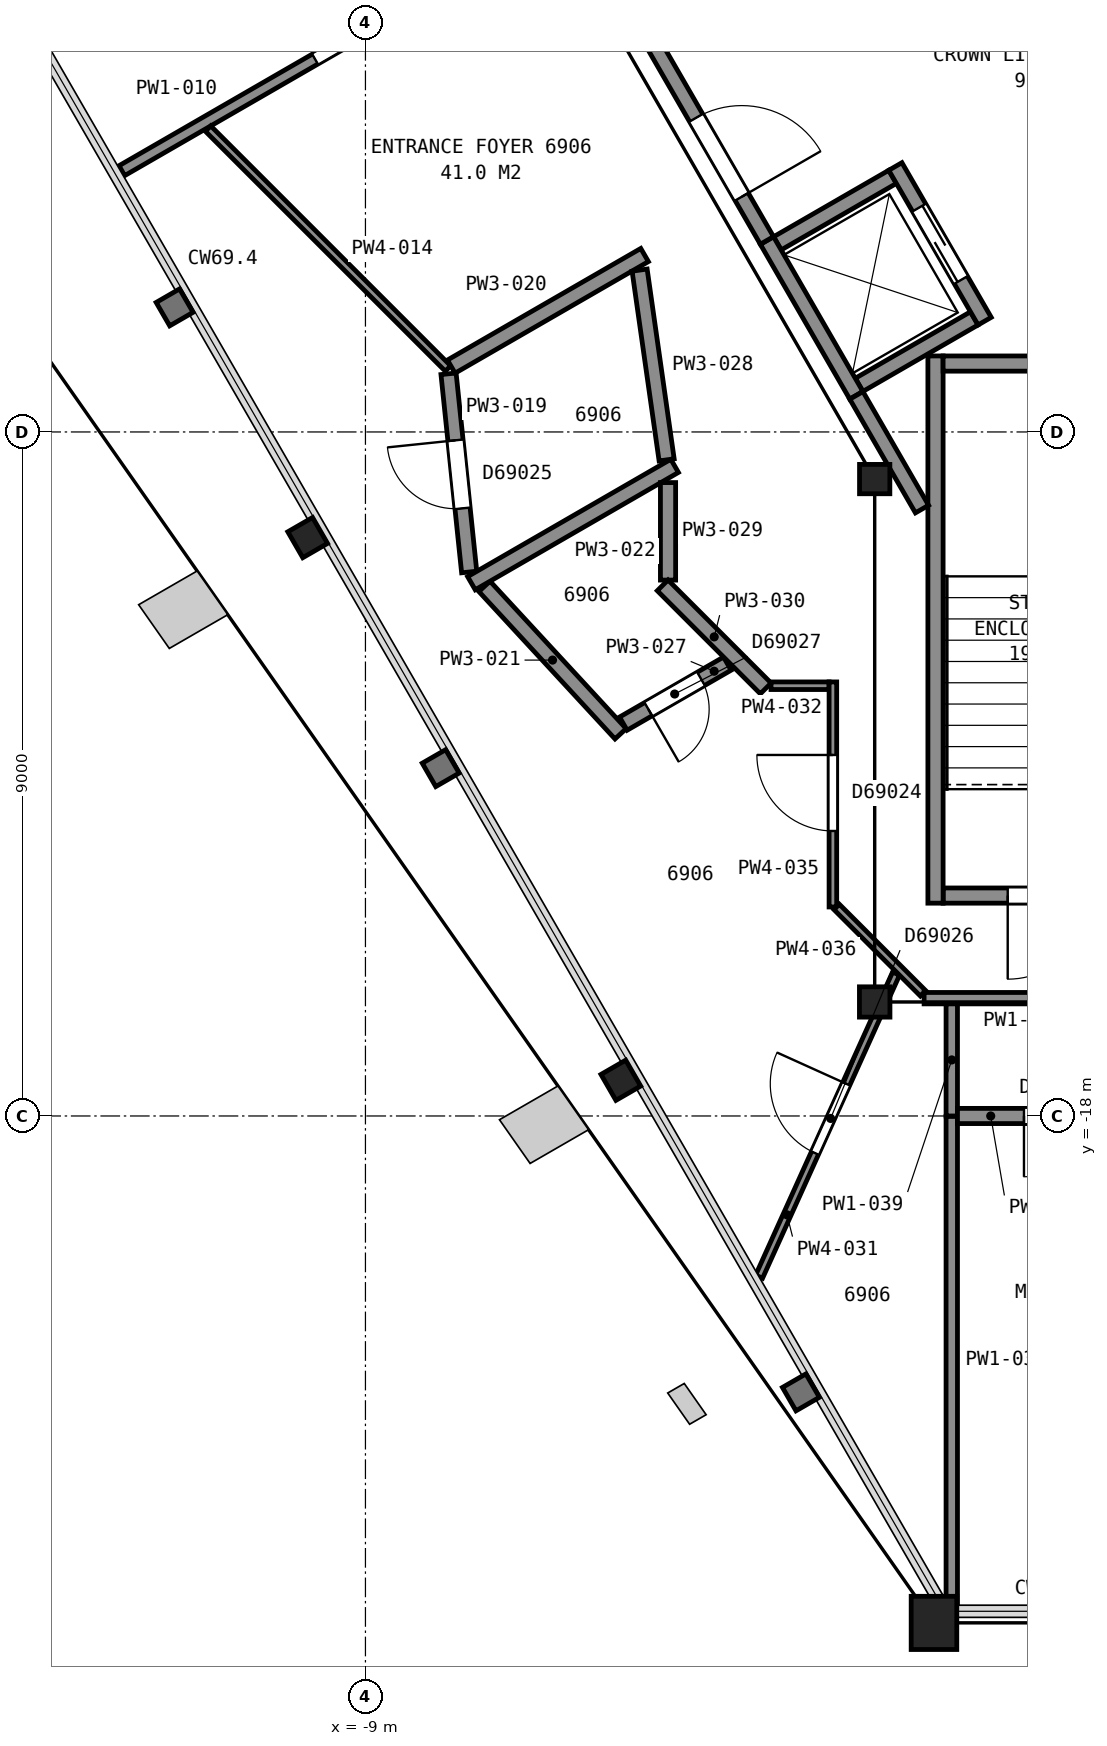
"""IFC4 building model, lengths in metres.
Left out: names, types, materials, properties, quantities, classifications, styles, units other than length and angle.
Written with IfcOpenShell. Run it as: python <this file> out.ifc"""

import sys

from ifc_helpers import new_model, si_unit, direction, frame, frame_2d, origin, origin_2d, place, context, subcontext, project, spatial, rectangle, hollow_rectangle, i_section, extrude, element, fill, save


model = new_model("IFC4")
c1 = context("Model", 3, precision=1e-05, world=origin(), true_north=direction((0.0, 1.0)))
c2 = subcontext(c1, "Body", "Model", "MODEL_VIEW")
j1 = project(units=[si_unit("LENGTHUNIT", "METRE"), si_unit("PLANEANGLEUNIT", "RADIAN")], contexts=[c1])
p1 = place(None, origin())
s1 = spatial("IfcSite", under=j1, at=p1, CompositionType="ELEMENT")
p2 = place(p1, origin())
s2 = spatial("IfcBuilding", under=s1, at=p2, CompositionType="ELEMENT")
p3 = place(p2, frame((0.0, 0.0, 275.1)))
s3 = spatial("IfcBuildingStorey", under=s2, at=p3, CompositionType="ELEMENT", Elevation=275.1)
for number, where, z_axis, x_axis in (
    (1, (-9.76, -10.39, 0.0), (0.0, 0.0, 1.0), (-0.5, 0.866, 0.0)),
    (2, (-5.64, -17.53, 0.0), (0.0, 0.0, 1.0), (-0.5, 0.866, 0.0)),
):
    element("IfcColumn", number, at=place(p3, frame(where, z_axis=z_axis, x_axis=x_axis)), inside=s3, PredefinedType="COLUMN", context=c2, shape_type="SweptSolid", body=[
        extrude(i_section(OverallWidth=0.394, OverallDepth=0.376, WebThickness=0.017, FlangeThickness=0.028, FilletRadius=0.015, at=origin_2d()), origin(), (0.0, 0.0, 1.0), 3.7),
    ])
p4 = place(p3, frame((-1.52, -24.67, 0.0), z_axis=(0.0, 0.0, 1.0), x_axis=(-1.0, 0.0, 0.0)))
e3 = element("IfcColumn", 3, at=p4, inside=s3, PredefinedType="COLUMN", context=c2, shape_type="SweptSolid", body=[
    extrude(hollow_rectangle(XDim=0.6, YDim=0.7, WallThickness=0.04, at=origin_2d()), origin(), (0.0, 0.0, 1.0), 3.7),
])
p5 = place(p3, frame((-2.3, -9.62, 0.0), z_axis=(0.0, 0.0, 1.0), x_axis=(1.0, 0.0, 0.0)))
e4 = element("IfcColumn", 4, at=p5, inside=s3, PredefinedType="COLUMN", context=c2, shape_type="SweptSolid", body=[
    extrude(i_section(OverallWidth=0.399, OverallDepth=0.386, WebThickness=0.021, FlangeThickness=0.033, FilletRadius=0.015, at=origin_2d()), origin(), (0.0, 0.0, 1.0), 3.7),
])
p6 = place(p3, frame((-2.3, -16.5, 0.0), z_axis=(0.0, 0.0, 1.0), x_axis=(-1.0, 0.0, 0.0)))
e5 = element("IfcColumn", 5, at=p6, inside=s3, PredefinedType="COLUMN", context=c2, shape_type="SweptSolid", body=[
    extrude(i_section(OverallWidth=0.401, OverallDepth=0.399, WebThickness=0.025, FlangeThickness=0.04, FilletRadius=0.015, at=origin_2d()), origin(), (0.0, 0.0, 1.0), 3.7),
])
p7 = place(p3, frame((-1.4, -15.1, 0.0), z_axis=(0.0, 0.0, 1.0), x_axis=(1.0, 0.0, 0.0)))
e6 = element("IfcWall", 6, at=p7, inside=s3, PredefinedType="PARTITIONING", context=c2, shape_type="SweptSolid", body=[
    extrude(rectangle(XDim=2.8, YDim=0.2, at=frame_2d((1.4, 0.0))), origin(), (0.0, 0.0, 1.0), 3.45),
])
p8 = place(p7, frame((0.85, 0.0, 0.0)))
e7 = element("IfcOpeningElement", 7, at=p8, cuts=e6, PredefinedType="OPENING", context=c2, shape_type="SweptSolid", body=[
    extrude(rectangle(XDim=1.1, YDim=2.1, at=frame_2d((0.55, 1.05))), frame((0.0, 0.11, 0.0), z_axis=(0.0, -1.0, 0.0), x_axis=(1.0, 0.0, 0.0)), (0.0, 0.0, 1.0), 0.22),
])
p9 = place(p3, frame((-1.5, -8.0, 0.0), z_axis=(0.0, 0.0, 1.0), x_axis=(0.0, -1.0, 0.0)))
e8 = element("IfcWall", 8, at=p9, inside=s3, PredefinedType="PARTITIONING", context=c2, shape_type="SweptSolid", body=[
    extrude(rectangle(XDim=7.2, YDim=0.2, at=frame_2d((3.6, 0.0))), origin(), (0.0, 0.0, 1.0), 3.45),
])
p10 = place(p3, frame((-1.4, -8.1, 0.0), z_axis=(0.0, 0.0, 1.0), x_axis=(1.0, 0.0, 0.0)))
e9 = element("IfcWall", 9, at=p10, inside=s3, PredefinedType="PARTITIONING", context=c2, shape_type="SweptSolid", body=[
    extrude(rectangle(XDim=2.8, YDim=0.2, at=frame_2d((1.4, 0.0))), origin(), (0.0, 0.0, 1.0), 3.45),
])
for number, where, z_axis, x_axis in (
    (10, (-2.505, -8.38, 0.0), (0.0, 0.0, 1.0), (0.866, 0.5, 0.0)),
    (11, (-3.58, -6.519, 0.0), (0.0, 0.0, 1.0), (0.866, 0.5, 0.0)),
):
    element("IfcWall", number, at=place(p3, frame(where, z_axis=z_axis, x_axis=x_axis)), inside=s3, PredefinedType="PARTITIONING", context=c2, shape_type="SweptSolid", body=[
        extrude(rectangle(XDim=1.75, YDim=0.2, at=frame_2d((0.875, 0.0))), origin(), (0.0, 0.0, 1.0), 3.7),
    ])
p11 = place(p3, frame((-0.853, -7.542, 0.0), z_axis=(0.0, 0.0, 1.0), x_axis=(-0.500016218704, 0.866016039709, 0.0)))
e12 = element("IfcWall", 12, at=p11, inside=s3, PredefinedType="PARTITIONING", context=c2, shape_type="SweptSolid", body=[
    extrude(rectangle(XDim=2.35, YDim=0.2, at=frame_2d((1.175, 0.0))), origin(), (0.0, 0.0, 1.0), 3.7),
])
p12 = place(p11, frame((0.625, 0.0, 0.0)))
e13 = element("IfcOpeningElement", 13, at=p12, cuts=e12, PredefinedType="OPENING", context=c2, shape_type="SweptSolid", body=[
    extrude(rectangle(XDim=1.1, YDim=2.1, at=frame_2d((0.55, 1.05))), frame((0.0, 0.11, 0.0), z_axis=(0.0, -1.0, 0.0), x_axis=(1.0, 0.0, 0.0)), (0.0, 0.0, 1.0), 0.22),
])
p13 = place(p3, frame((-2.542, -8.517, 0.0), z_axis=(0.0, 0.0, 1.0), x_axis=(-0.500016218704, 0.866016039709, 0.0)))
e14 = element("IfcWall", 14, at=p13, inside=s3, PredefinedType="PARTITIONING", context=c2, shape_type="SweptSolid", body=[
    extrude(rectangle(XDim=2.35, YDim=0.2, at=frame_2d((1.175, 0.0))), origin(), (0.0, 0.0, 1.0), 3.7),
])
p14 = place(p3, frame((-7.141, -0.551, 0.0), z_axis=(0.0, 0.0, 1.0), x_axis=(0.500001302854, -0.86602465158, 0.0)))
e15 = element("IfcWall", 15, at=p14, inside=s3, PredefinedType="PARTITIONING", context=c2, shape_type="SweptSolid", body=[
    extrude(rectangle(XDim=6.846, YDim=0.2, at=frame_2d((3.423, 0.0))), origin(), (0.0, 0.0, 1.0), 3.45),
])
p15 = place(p14, frame((4.983, 0.0, 0.0)))
e16 = element("IfcOpeningElement", 16, at=p15, cuts=e15, PredefinedType="OPENING", context=c2, shape_type="SweptSolid", body=[
    extrude(rectangle(XDim=1.2, YDim=2.1, at=frame_2d((0.6, 1.05))), frame((0.0, 0.11, 0.0), z_axis=(0.0, -1.0, 0.0), x_axis=(1.0, 0.0, 0.0)), (0.0, 0.0, 1.0), 0.22),
])
p16 = place(p3, frame((-2.541, -8.519, 0.0), z_axis=(0.0, 0.0, 1.0), x_axis=(0.500016142392, -0.86601608377, 0.0)))
e17 = element("IfcWall", 17, at=p16, inside=s3, PredefinedType="PARTITIONING", context=c2, shape_type="SweptSolid", body=[
    extrude(rectangle(XDim=1.727, YDim=0.2, at=frame_2d((0.864, 0.0))), origin(), (0.0, 0.0, 1.0), 3.45),
])
p17 = place(p3, frame((-12.205, -5.562, 0.0), z_axis=(0.0, 0.0, 1.0), x_axis=(0.866006351856, 0.500032997455, 0.0)))
e18 = element("IfcWall", 18, at=p17, inside=s3, PredefinedType="PARTITIONING", context=c2, shape_type="SweptSolid", body=[
    extrude(rectangle(XDim=5.671, YDim=0.15, at=frame_2d((2.835, 0.0))), origin(), (0.0, 0.0, 1.0), 2.723),
])
p18 = place(p17, frame((2.935, 0.0, 0.0)))
e19 = element("IfcOpeningElement", 19, at=p18, cuts=e18, PredefinedType="OPENING", context=c2, shape_type="SweptSolid", body=[
    extrude(rectangle(XDim=1.0, YDim=2.1, at=frame_2d((0.5, 1.05))), frame((0.0, 0.085, 0.0), z_axis=(0.0, -1.0, 0.0), x_axis=(1.0, 0.0, 0.0)), (0.0, 0.0, 1.0), 0.17),
])
p19 = place(p3, frame((-11.071, -5.008, 0.0), z_axis=(0.0, 0.0, 1.0), x_axis=(0.707079435951, -0.707134125365, 0.0)))
e20 = element("IfcWall", 20, at=p19, inside=s3, PredefinedType="PARTITIONING", context=c2, shape_type="SweptSolid", body=[
    extrude(rectangle(XDim=4.464, YDim=0.1, at=frame_2d((2.232, 0.0))), origin(), (0.0, 0.0, 1.0), 2.723),
])
p20 = place(p3, frame((-7.907, -8.235, 0.0), z_axis=(0.0, 0.0, 1.0), x_axis=(0.103623353624, -0.994616609847, 0.0)))
e21 = element("IfcWall", 21, at=p20, inside=s3, PredefinedType="PARTITIONING", context=c2, shape_type="SweptSolid", body=[
    extrude(rectangle(XDim=2.622, YDim=0.2, at=frame_2d((1.311, 0.0))), origin(), (0.0, 0.0, 1.0), 2.723),
])
p21 = place(p20, frame((0.88, 0.0, 0.0)))
e22 = element("IfcOpeningElement", 22, at=p21, cuts=e21, PredefinedType="OPENING", context=c2, shape_type="SweptSolid", body=[
    extrude(rectangle(XDim=0.9, YDim=2.1, at=frame_2d((0.45, 1.05))), frame((0.0, 0.11, 0.0), z_axis=(0.0, -1.0, 0.0), x_axis=(1.0, 0.0, 0.0)), (0.0, 0.0, 1.0), 0.22),
])
p22 = place(p3, frame((-7.871, -8.14, 0.0), z_axis=(0.0, 0.0, 1.0), x_axis=(0.866106676517, 0.49985920507, 0.0)))
e23 = element("IfcWall", 23, at=p22, inside=s3, PredefinedType="PARTITIONING", context=c2, shape_type="SweptSolid", body=[
    extrude(rectangle(XDim=2.936, YDim=0.2, at=frame_2d((1.468, 0.0))), origin(), (0.0, 0.0, 1.0), 2.723),
])
p23 = place(p3, frame((-7.434, -11.032, 0.0), z_axis=(0.0, 0.0, 1.0), x_axis=(0.678387636859, -0.734704167782, 0.0)))
e24 = element("IfcWall", 24, at=p23, inside=s3, PredefinedType="PARTITIONING", context=c2, shape_type="SweptSolid", body=[
    extrude(rectangle(XDim=2.64, YDim=0.2, at=frame_2d((1.32, 0.0))), origin(), (0.0, 0.0, 1.0), 2.723),
])
p24 = place(p3, frame((-7.606, -10.99, 0.0), z_axis=(0.0, 0.0, 1.0), x_axis=(0.865956409518, 0.500119482538, 0.0)))
e25 = element("IfcWall", 25, at=p24, inside=s3, PredefinedType="PARTITIONING", context=c2, shape_type="SweptSolid", body=[
    extrude(rectangle(XDim=3.087, YDim=0.2, at=frame_2d((1.543, 0.0))), origin(), (0.0, 0.0, 1.0), 2.723),
])
p25 = place(p3, frame((-5.607, -12.838, 0.0), z_axis=(0.0, 0.0, 1.0), x_axis=(0.866095534226, 0.499878510834, 0.0)))
e26 = element("IfcWall", 26, at=p25, inside=s3, PredefinedType="PARTITIONING", context=c2, shape_type="SweptSolid", body=[
    extrude(rectangle(XDim=1.58, YDim=0.2, at=frame_2d((0.79, 0.0))), origin(), (0.0, 0.0, 1.0), 2.723),
])
p26 = place(p25, frame((0.38, 0.0, 0.0)))
e27 = element("IfcOpeningElement", 27, at=p26, cuts=e26, PredefinedType="OPENING", context=c2, shape_type="SweptSolid", body=[
    extrude(rectangle(XDim=0.8, YDim=2.1, at=frame_2d((0.4, 1.05))), frame((0.0, 0.11, 0.0), z_axis=(0.0, -1.0, 0.0), x_axis=(1.0, 0.0, 0.0)), (0.0, 0.0, 1.0), 0.22),
])
p27 = place(p3, frame((-5.393, -6.871, 0.0), z_axis=(0.0, 0.0, 1.0), x_axis=(0.140960508483, -0.990015219604, 0.0)))
e28 = element("IfcWall", 28, at=p27, inside=s3, PredefinedType="PARTITIONING", context=c2, shape_type="SweptSolid", body=[
    extrude(rectangle(XDim=2.522, YDim=0.2, at=frame_2d((1.261, 0.0))), origin(), (0.0, 0.0, 1.0), 2.723),
])
p28 = place(p3, frame((-5.019, -10.949, 0.0), z_axis=(0.0, 0.0, 1.0), x_axis=(0.0, 1.0, 0.0)))
e29 = element("IfcWall", 29, at=p28, inside=s3, PredefinedType="PARTITIONING", context=c2, shape_type="SweptSolid", body=[
    extrude(rectangle(XDim=1.283, YDim=0.2, at=frame_2d((0.642, 0.0))), origin(), (0.0, 0.0, 1.0), 2.723),
])
p29 = place(p3, frame((-5.09, -11.018, 0.0), z_axis=(0.0, 0.0, 1.0), x_axis=(0.707106781187, -0.707106781187, 0.0)))
e30 = element("IfcWall", 30, at=p29, inside=s3, PredefinedType="PARTITIONING", context=c2, shape_type="SweptSolid", body=[
    extrude(rectangle(XDim=1.918, YDim=0.2, at=frame_2d((0.959, 0.0))), origin(), (0.0, 0.0, 1.0), 2.723),
])
p30 = place(p3, frame((-2.019, -16.127, 0.0), z_axis=(0.0, 0.0, 1.0), x_axis=(-0.411876718461, -0.911239578151, 0.0)))
e31 = element("IfcWall", 31, at=p30, inside=s3, PredefinedType="PARTITIONING", context=c2, shape_type="SweptSolid", body=[
    extrude(rectangle(XDim=4.376, YDim=0.1, at=frame_2d((2.188, 0.0))), origin(), (0.0, 0.0, 1.0), 2.723),
])
p31 = place(p30, frame((1.591, 0.0, 0.0)))
e32 = element("IfcOpeningElement", 32, at=p31, cuts=e31, PredefinedType="OPENING", context=c2, shape_type="SweptSolid", body=[
    extrude(rectangle(XDim=1.0, YDim=2.1, at=frame_2d((0.5, 1.05))), frame((0.0, 0.06, 0.0), z_axis=(0.0, -1.0, 0.0), x_axis=(1.0, 0.0, 0.0)), (0.0, 0.0, 1.0), 0.12),
])
p32 = place(p3, frame((-3.664, -12.339, 0.0), z_axis=(0.0, 0.0, 1.0), x_axis=(1.0, 0.0, 0.0)))
e33 = element("IfcWall", 33, at=p32, inside=s3, PredefinedType="PARTITIONING", context=c2, shape_type="SweptSolid", body=[
    extrude(rectangle(XDim=0.764, YDim=0.1, at=frame_2d((0.382, 0.0))), origin(), (0.0, 0.0, 1.0), 2.723),
])
p33 = place(p3, frame((-2.85, -15.25, 0.0), z_axis=(0.0, 0.0, 1.0), x_axis=(0.0, 1.0, 0.0)))
e34 = element("IfcWall", 34, at=p33, inside=s3, PredefinedType="PARTITIONING", context=c2, shape_type="SweptSolid", body=[
    extrude(rectangle(XDim=2.961, YDim=0.1, at=frame_2d((1.48, 0.0))), origin(), (0.0, 0.0, 1.0), 2.723),
])
p34 = place(p33, frame((1.0, 0.0, 0.0)))
e35 = element("IfcOpeningElement", 35, at=p34, cuts=e34, PredefinedType="OPENING", context=c2, shape_type="SweptSolid", body=[
    extrude(rectangle(XDim=1.0, YDim=2.1, at=frame_2d((0.5, 1.05))), frame((0.0, 0.06, 0.0), z_axis=(0.0, -1.0, 0.0), x_axis=(1.0, 0.0, 0.0)), (0.0, 0.0, 1.0), 0.12),
])
p35 = place(p3, frame((-2.801, -15.25, 0.0), z_axis=(0.0, 0.0, 1.0), x_axis=(0.707106781187, -0.707106781187, 0.0)))
e36 = element("IfcWall", 36, at=p35, inside=s3, PredefinedType="PARTITIONING", context=c2, shape_type="SweptSolid", body=[
    extrude(rectangle(XDim=1.608, YDim=0.1, at=frame_2d((0.804, 0.0))), origin(), (0.0, 0.0, 1.0), 2.723),
])
p36 = place(p3, frame((-1.65, -16.45, 0.0), z_axis=(0.0, 0.0, 1.0), x_axis=(1.0, 0.0, 0.0)))
e37 = element("IfcWall", 37, at=p36, inside=s3, PredefinedType="PARTITIONING", context=c2, shape_type="SweptSolid", body=[
    extrude(rectangle(XDim=2.625, YDim=0.15, at=frame_2d((1.312, 0.0))), origin(), (0.0, 0.0, 1.0), 2.723),
])
p37 = place(p3, frame((-1.286, -24.421, 0.0), z_axis=(0.0, 0.0, 1.0), x_axis=(0.0, 1.0, 0.0)))
e38 = element("IfcWall", 38, at=p37, inside=s3, PredefinedType="PARTITIONING", context=c2, shape_type="SweptSolid", body=[
    extrude(rectangle(XDim=6.416, YDim=0.15, at=frame_2d((3.208, 0.0))), origin(), (0.0, 0.0, 1.0), 2.723),
])
p38 = place(p3, frame((-1.286, -18.0, 0.0), z_axis=(0.0, 0.0, 1.0), x_axis=(0.0, 1.0, 0.0)))
e39 = element("IfcWall", 39, at=p38, inside=s3, PredefinedType="PARTITIONING", context=c2, shape_type="SweptSolid", body=[
    extrude(rectangle(XDim=1.475, YDim=0.15, at=frame_2d((0.738, 0.0))), origin(), (0.0, 0.0, 1.0), 2.723),
])
p39 = place(p3, frame((-1.211, -18.0, 0.0), z_axis=(0.0, 0.0, 1.0), x_axis=(1.0, 0.0, 0.0)))
e40 = element("IfcWall", 40, at=p39, inside=s3, PredefinedType="PARTITIONING", context=c2, shape_type="SweptSolid", body=[
    extrude(rectangle(XDim=2.511, YDim=0.2, at=frame_2d((1.255, 0.0))), origin(), (0.0, 0.0, 1.0), 2.723),
])
p40 = place(p39, frame((0.875, 0.0, 0.0)))
e41 = element("IfcOpeningElement", 41, at=p40, cuts=e40, PredefinedType="OPENING", context=c2, shape_type="SweptSolid", body=[
    extrude(rectangle(XDim=0.8, YDim=2.1, at=frame_2d((0.4, 1.05))), frame((0.0, 0.11, 0.0), z_axis=(0.0, -1.0, 0.0), x_axis=(1.0, 0.0, 0.0)), (0.0, 0.0, 1.0), 0.22),
])
p41 = place(p8, origin())
e42 = element("IfcDoor", 42, at=p41, inside=s3, OperationType="SINGLE_SWING_LEFT", PredefinedType="DOOR", context=c2, shape_type="SweptSolid", body=[
    extrude(rectangle(XDim=1.1, YDim=2.1, at=frame_2d((0.55, 1.05))), frame((0.0, 0.025, 0.0), z_axis=(0.0, -1.0, 0.0), x_axis=(1.0, 0.0, 0.0)), (0.0, 0.0, 1.0), 0.05),
])
fill(e7, e42)
p42 = place(p12, origin())
e43 = element("IfcDoor", 43, at=p42, inside=s3, OperationType="SLIDING_TO_LEFT", PredefinedType="DOOR", context=c2, shape_type="SweptSolid", body=[
    extrude(rectangle(XDim=1.1, YDim=2.1, at=frame_2d((0.55, 1.05))), frame((0.0, 0.025, 0.0), z_axis=(0.0, -1.0, 0.0), x_axis=(1.0, 0.0, 0.0)), (0.0, 0.0, 1.0), 0.05),
])
fill(e13, e43)
p43 = place(p15, origin())
e44 = element("IfcDoor", 44, at=p43, inside=s3, OperationType="SINGLE_SWING_RIGHT", PredefinedType="DOOR", context=c2, shape_type="SweptSolid", body=[
    extrude(rectangle(XDim=1.2, YDim=2.1, at=frame_2d((0.6, 1.05))), frame((0.0, 0.025, 0.0), z_axis=(0.0, -1.0, 0.0), x_axis=(1.0, 0.0, 0.0)), (0.0, 0.0, 1.0), 0.05),
])
fill(e16, e44)
p44 = place(p18, origin())
e45 = element("IfcDoor", 45, at=p44, inside=s3, OperationType="SINGLE_SWING_RIGHT", PredefinedType="DOOR", context=c2, shape_type="SweptSolid", body=[
    extrude(rectangle(XDim=1.0, YDim=2.1, at=frame_2d((0.5, 1.05))), frame((0.0, 0.025, 0.0), z_axis=(0.0, -1.0, 0.0), x_axis=(1.0, 0.0, 0.0)), (0.0, 0.0, 1.0), 0.05),
])
fill(e19, e45)
p45 = place(p21, origin())
e46 = element("IfcDoor", 46, at=p45, inside=s3, OperationType="SINGLE_SWING_LEFT", PredefinedType="DOOR", context=c2, shape_type="SweptSolid", body=[
    extrude(rectangle(XDim=0.9, YDim=2.1, at=frame_2d((0.45, 1.05))), frame((0.0, 0.025, 0.0), z_axis=(0.0, -1.0, 0.0), x_axis=(1.0, 0.0, 0.0)), (0.0, 0.0, 1.0), 0.05),
])
fill(e22, e46)
p46 = place(p26, origin())
e47 = element("IfcDoor", 47, at=p46, inside=s3, OperationType="SINGLE_SWING_LEFT", PredefinedType="DOOR", context=c2, shape_type="SweptSolid", body=[
    extrude(rectangle(XDim=0.8, YDim=2.1, at=frame_2d((0.4, 1.05))), frame((0.0, 0.025, 0.0), z_axis=(0.0, -1.0, 0.0), x_axis=(1.0, 0.0, 0.0)), (0.0, 0.0, 1.0), 0.05),
])
fill(e27, e47)
p47 = place(p31, origin())
e48 = element("IfcDoor", 48, at=p47, inside=s3, OperationType="SINGLE_SWING_LEFT", PredefinedType="DOOR", context=c2, shape_type="SweptSolid", body=[
    extrude(rectangle(XDim=1.0, YDim=2.1, at=frame_2d((0.5, 1.05))), frame((0.0, 0.025, 0.0), z_axis=(0.0, -1.0, 0.0), x_axis=(1.0, 0.0, 0.0)), (0.0, 0.0, 1.0), 0.05),
])
fill(e32, e48)
p48 = place(p34, origin())
e49 = element("IfcDoor", 49, at=p48, inside=s3, OperationType="SINGLE_SWING_RIGHT", PredefinedType="DOOR", context=c2, shape_type="SweptSolid", body=[
    extrude(rectangle(XDim=1.0, YDim=2.1, at=frame_2d((0.5, 1.05))), frame((0.0, 0.025, 0.0), z_axis=(0.0, -1.0, 0.0), x_axis=(1.0, 0.0, 0.0)), (0.0, 0.0, 1.0), 0.05),
])
fill(e35, e49)
p49 = place(p40, origin())
e50 = element("IfcDoor", 50, at=p49, inside=s3, OperationType="SINGLE_SWING_LEFT", PredefinedType="DOOR", context=c2, shape_type="SweptSolid", body=[
    extrude(rectangle(XDim=0.8, YDim=2.1, at=frame_2d((0.4, 1.05))), frame((0.0, 0.025, 0.0), z_axis=(0.0, -1.0, 0.0), x_axis=(1.0, 0.0, 0.0)), (0.0, 0.0, 1.0), 0.05),
])
fill(e41, e50)
save(model, sys.argv[1])
